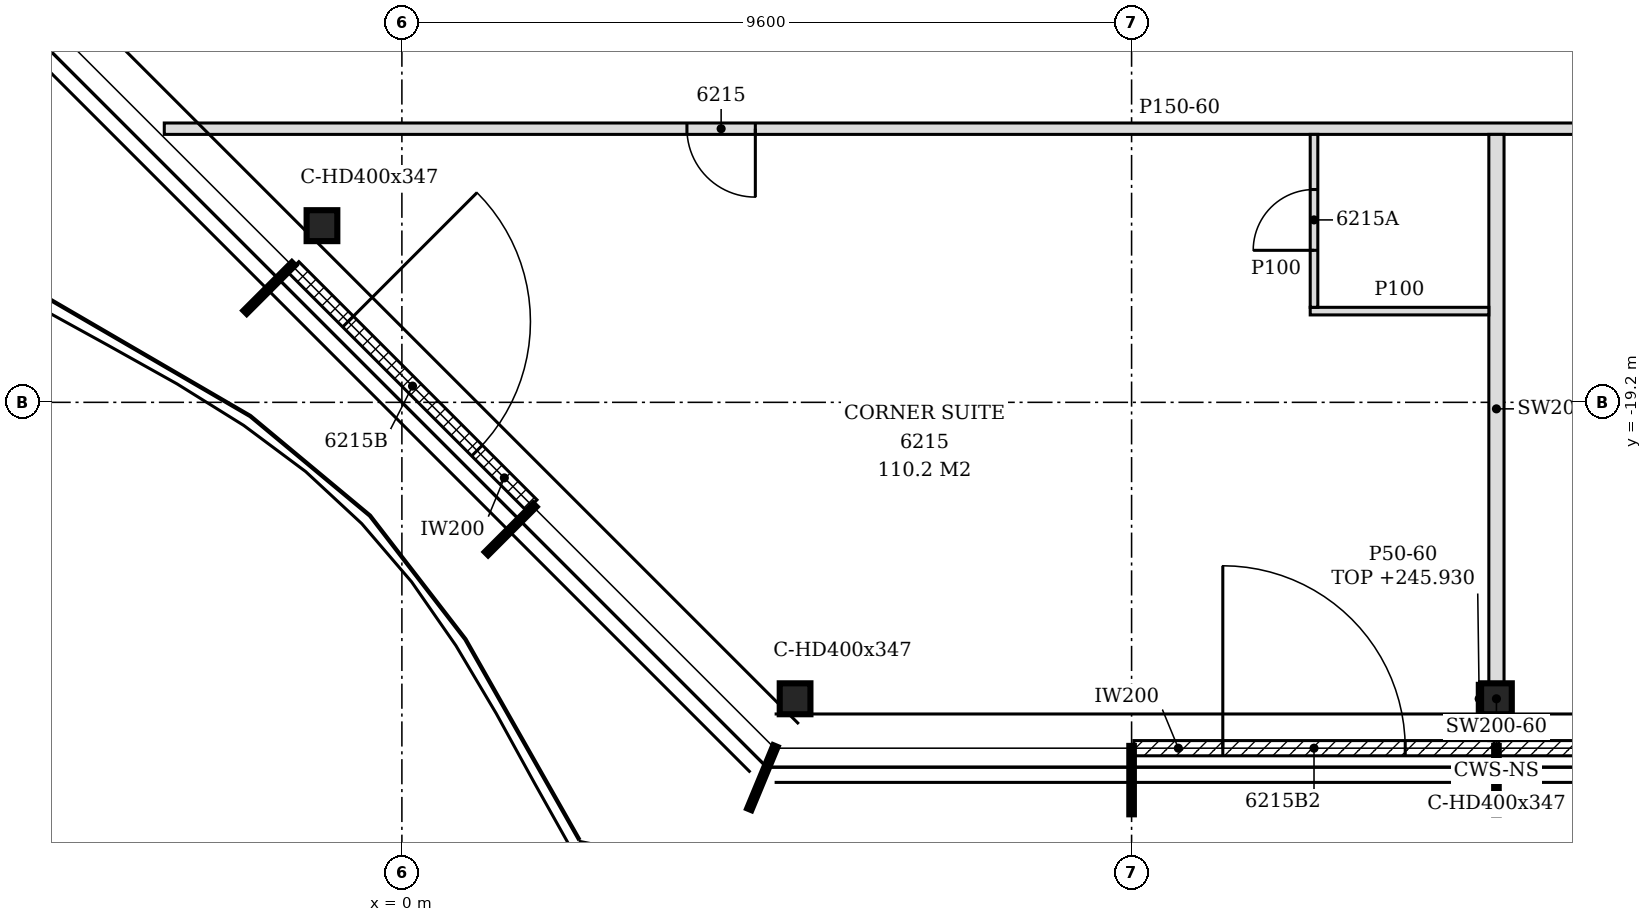
"""IFC4 building model, lengths in metres.
Left out: names, types, materials, properties, quantities, classifications, styles, units other than length and angle.
Written with IfcOpenShell. Run it as: python <this file> out.ifc"""

import sys

from ifc_helpers import new_model, si_unit, direction, frame, frame_2d, origin, origin_2d, place, context, subcontext, project, spatial, polyline, rectangle, i_section, outline, extrude, element, fill, save


model = new_model("IFC4")
c1 = context("Model", 3, precision=1e-05, world=origin(), true_north=direction((0.0, 1.0)))
c2 = subcontext(c1, "Body", "Model", "MODEL_VIEW")
j1 = project(units=[si_unit("LENGTHUNIT", "METRE"), si_unit("PLANEANGLEUNIT", "RADIAN")], contexts=[c1])
p1 = place(None, origin())
s1 = spatial("IfcSite", under=j1, at=p1, CompositionType="ELEMENT")
p2 = place(p1, origin())
s2 = spatial("IfcBuilding", under=s1, at=p2, CompositionType="ELEMENT")
p3 = place(p2, frame((0.0, 0.0, 243.0)))
s3 = spatial("IfcBuildingStorey", under=s2, at=p3, CompositionType="ELEMENT", Elevation=243.0)
for number, where, z_axis, x_axis in (
    (1, (5.173, -23.1, -0.15), (0.0, 0.0, 1.0), (1.0, 0.0, 0.0)),
    (2, (14.4, -23.1, -0.15), (0.0, 0.0, 1.0), (1.0, 0.0, 0.0)),
    (3, (-1.052, -16.876, -0.15), (0.0, 0.0, 1.0), (1.0, 0.0, 0.0)),
):
    element("IfcColumn", number, at=place(p3, frame(where, z_axis=z_axis, x_axis=x_axis)), inside=s3, PredefinedType="COLUMN", context=c2, shape_type="SweptSolid", body=[
        extrude(i_section(OverallWidth=0.404, OverallDepth=0.407, WebThickness=0.027, FlangeThickness=0.044, FilletRadius=0.015, at=origin_2d()), origin(), (0.0, 0.0, 1.0), 3.6),
    ])
p4 = place(p3, frame((9.63, -23.75, 0.0), z_axis=(0.0, 0.0, 1.0), x_axis=(1.0, 0.0, 0.0)))
e4 = element("IfcWall", 4, at=p4, inside=s3, PredefinedType="NOTDEFINED", context=c2, shape_type="SweptSolid", body=[
    extrude(rectangle(XDim=4.74, YDim=0.2, at=frame_2d((2.37, 0.0))), origin(), (0.0, 0.0, 1.0), 3.45),
])
p5 = place(p4, frame((1.17, 0.0, 0.0)))
e5 = element("IfcOpeningElement", 5, at=p5, cuts=e4, PredefinedType="OPENING", context=c2, shape_type="SweptSolid", body=[
    extrude(rectangle(XDim=2.4, YDim=2.4, at=frame_2d((1.2, 1.2))), frame((0.0, 0.11, 0.0), z_axis=(0.0, -1.0, 0.0), x_axis=(1.0, 0.0, 0.0)), (0.0, 0.0, 1.0), 0.22),
])
p6 = place(p3, frame((14.43, -23.75, 0.0), z_axis=(0.0, 0.0, 1.0), x_axis=(1.0, 0.0, 0.0)))
e6 = element("IfcWall", 6, at=p6, inside=s3, PredefinedType="NOTDEFINED", context=c2, shape_type="SweptSolid", body=[
    extrude(rectangle(XDim=4.74, YDim=0.2, at=frame_2d((2.37, 0.0))), origin(), (0.0, 0.0, 1.0), 3.45),
])
p7 = place(p6, frame((1.17, 0.0, 0.0)))
e7 = element("IfcOpeningElement", 7, at=p7, cuts=e6, PredefinedType="OPENING", context=c2, shape_type="SweptSolid", body=[
    extrude(rectangle(XDim=2.4, YDim=2.4, at=frame_2d((1.2, 1.2))), frame((0.0, 0.11, 0.0), z_axis=(0.0, -1.0, 0.0), x_axis=(1.0, 0.0, 0.0)), (0.0, 0.0, 1.0), 0.22),
])
p8 = place(p3, frame((-1.427, -17.42, 0.0), z_axis=(0.0, 0.0, 1.0), x_axis=(0.707106781187, -0.707106781187, 0.0)))
e8 = element("IfcWall", 8, at=p8, inside=s3, PredefinedType="NOTDEFINED", context=c2, shape_type="SweptSolid", body=[
    extrude(rectangle(XDim=4.431, YDim=0.2, at=frame_2d((2.216, 0.0))), origin(), (0.0, 0.0, 1.0), 3.45),
])
p9 = place(p8, frame((1.015, 0.0, 0.0)))
e9 = element("IfcOpeningElement", 9, at=p9, cuts=e8, PredefinedType="OPENING", context=c2, shape_type="SweptSolid", body=[
    extrude(rectangle(XDim=2.4, YDim=2.4, at=frame_2d((1.2, 1.2))), frame((0.0, 0.11, 0.0), z_axis=(0.0, -1.0, 0.0), x_axis=(1.0, 0.0, 0.0)), (0.0, 0.0, 1.0), 0.22),
])
p10 = place(p3, frame((14.4, -23.65, 0.0), z_axis=(0.0, 0.0, 1.0), x_axis=(0.0, 1.0, 0.0)))
e10 = element("IfcWall", 10, at=p10, inside=s3, PredefinedType="PARTITIONING", context=c2, shape_type="SweptSolid", body=[
    extrude(rectangle(XDim=0.346, YDim=0.2, at=frame_2d((0.173, 0.0))), origin(), (0.0, 0.0, 1.0), 3.45),
])
p11 = place(p3, frame((14.4, -22.896, 0.0), z_axis=(0.0, 0.0, 1.0), x_axis=(0.0, 1.0, 0.0)))
e11 = element("IfcWall", 11, at=p11, inside=s3, PredefinedType="PARTITIONING", context=c2, shape_type="SweptSolid", body=[
    extrude(outline(polyline([(0.0, 0.0), (7.221, 0.0), (7.221, 3.45), (3.802, 3.45), (3.8, 2.88), (3.592, 2.88), (3.59, 3.45), (0.0, 3.45), (0.0, 0.0)])), frame((0.0, 0.1, 0.0), z_axis=(0.0, -1.0, 0.0), x_axis=(1.0, 0.0, 0.0)), (0.0, 0.0, 1.0), 0.2),
])
p12 = place(p3, frame((11.95, -18.0, 0.0), z_axis=(0.0, 0.0, 1.0), x_axis=(1.0, 0.0, 0.0)))
e12 = element("IfcWall", 12, at=p12, inside=s3, PredefinedType="PARTITIONING", context=c2, shape_type="SweptSolid", body=[
    extrude(rectangle(XDim=2.35, YDim=0.1, at=frame_2d((1.175, 0.0))), origin(), (0.0, 0.0, 1.0), 3.45),
])
p13 = place(p3, frame((12.0, -17.95, 0.0), z_axis=(0.0, 0.0, 1.0), x_axis=(0.0, 1.0, 0.0)))
e13 = element("IfcWall", 13, at=p13, inside=s3, PredefinedType="PARTITIONING", context=c2, shape_type="SweptSolid", body=[
    extrude(rectangle(XDim=2.275, YDim=0.1, at=frame_2d((1.137, 0.0))), origin(), (0.0, 0.0, 1.0), 3.45),
])
p14 = place(p13, frame((0.75, 0.0, 0.0)))
e14 = element("IfcOpeningElement", 14, at=p14, cuts=e13, PredefinedType="OPENING", context=c2, shape_type="SweptSolid", body=[
    extrude(rectangle(XDim=0.8, YDim=2.1, at=frame_2d((0.4, 1.05))), frame((0.0, 0.06, 0.0), z_axis=(0.0, -1.0, 0.0), x_axis=(1.0, 0.0, 0.0)), (0.0, 0.0, 1.0), 0.12),
])
p15 = place(p3, frame((-3.126, -15.6, 0.0), z_axis=(0.0, 0.0, 1.0), x_axis=(1.0, 0.0, 0.0)))
e15 = element("IfcWall", 15, at=p15, inside=s3, PredefinedType="PARTITIONING", context=c2, shape_type="SweptSolid", body=[
    extrude(outline(polyline([(0.0, 0.0), (23.753, 0.0), (23.753, 3.45), (22.476, 3.45), (22.474, 2.73), (22.176, 2.73), (22.174, 3.45), (10.476, 3.45), (10.474, 2.73), (10.176, 2.73), (10.174, 3.45), (1.369, 3.45), (1.367, 2.63), (0.229, 2.63), (0.227, 3.45), (0.0, 3.45), (0.0, 0.0)])), frame((0.0, 0.075, 0.0), z_axis=(0.0, -1.0, 0.0), x_axis=(1.0, 0.0, 0.0)), (0.0, 0.0, 1.0), 0.15),
])
p16 = place(p15, frame((18.937, 0.0, 0.0)))
e16 = element("IfcOpeningElement", 16, at=p16, cuts=e15, PredefinedType="OPENING", context=c2, shape_type="SweptSolid", body=[
    extrude(rectangle(XDim=0.9, YDim=2.1, at=frame_2d((0.45, 1.05))), frame((0.0, 0.085, 0.0), z_axis=(0.0, -1.0, 0.0), x_axis=(1.0, 0.0, 0.0)), (0.0, 0.0, 1.0), 0.17),
])
p17 = place(p15, frame((6.876, 0.0, 0.0)))
e17 = element("IfcOpeningElement", 17, at=p17, cuts=e15, PredefinedType="OPENING", context=c2, shape_type="SweptSolid", body=[
    extrude(rectangle(XDim=0.9, YDim=2.1, at=frame_2d((0.45, 1.05))), frame((0.0, 0.085, 0.0), z_axis=(0.0, -1.0, 0.0), x_axis=(1.0, 0.0, 0.0)), (0.0, 0.0, 1.0), 0.17),
])
p18 = place(p3, frame((14.173, -23.303, 0.0), z_axis=(0.0, 0.0, 1.0), x_axis=(0.0, 1.0, 0.0)))
e18 = element("IfcWall", 18, at=p18, inside=s3, PredefinedType="PARTITIONING", context=c2, shape_type="SweptSolid", body=[
    extrude(rectangle(XDim=0.407, YDim=0.05, at=frame_2d((0.204, 0.0))), origin(), (0.0, 0.0, 1.0), 2.93),
])
p19 = place(p5, origin())
e19 = element("IfcDoor", 19, at=p19, inside=s3, OperationType="SINGLE_SWING_LEFT", PredefinedType="DOOR", context=c2, shape_type="SweptSolid", body=[
    extrude(rectangle(XDim=2.4, YDim=2.4, at=frame_2d((1.2, 1.2))), frame((0.0, 0.025, 0.0), z_axis=(0.0, -1.0, 0.0), x_axis=(1.0, 0.0, 0.0)), (0.0, 0.0, 1.0), 0.05),
])
fill(e5, e19)
p20 = place(p9, origin())
e20 = element("IfcDoor", 20, at=p20, inside=s3, OperationType="SINGLE_SWING_LEFT", PredefinedType="DOOR", context=c2, shape_type="SweptSolid", body=[
    extrude(rectangle(XDim=2.4, YDim=2.4, at=frame_2d((1.2, 1.2))), frame((0.0, 0.025, 0.0), z_axis=(0.0, -1.0, 0.0), x_axis=(1.0, 0.0, 0.0)), (0.0, 0.0, 1.0), 0.05),
])
fill(e9, e20)
p21 = place(p17, frame((0.9, 0.0, 0.0), z_axis=(0.0, 0.0, 1.0), x_axis=(-1.0, 0.0, 0.0)))
e21 = element("IfcDoor", 21, at=p21, inside=s3, OperationType="SINGLE_SWING_LEFT", PredefinedType="DOOR", context=c2, shape_type="SweptSolid", body=[
    extrude(rectangle(XDim=0.9, YDim=2.1, at=frame_2d((0.45, 1.05))), frame((0.0, 0.025, 0.0), z_axis=(0.0, -1.0, 0.0), x_axis=(1.0, 0.0, 0.0)), (0.0, 0.0, 1.0), 0.05),
])
fill(e17, e21)
p22 = place(p14, origin())
e22 = element("IfcDoor", 22, at=p22, inside=s3, OperationType="SINGLE_SWING_LEFT", PredefinedType="DOOR", context=c2, shape_type="SweptSolid", body=[
    extrude(rectangle(XDim=0.8, YDim=2.1, at=frame_2d((0.4, 1.05))), frame((0.0, 0.025, 0.0), z_axis=(0.0, -1.0, 0.0), x_axis=(1.0, 0.0, 0.0)), (0.0, 0.0, 1.0), 0.05),
])
fill(e14, e22)
save(model, sys.argv[1])
